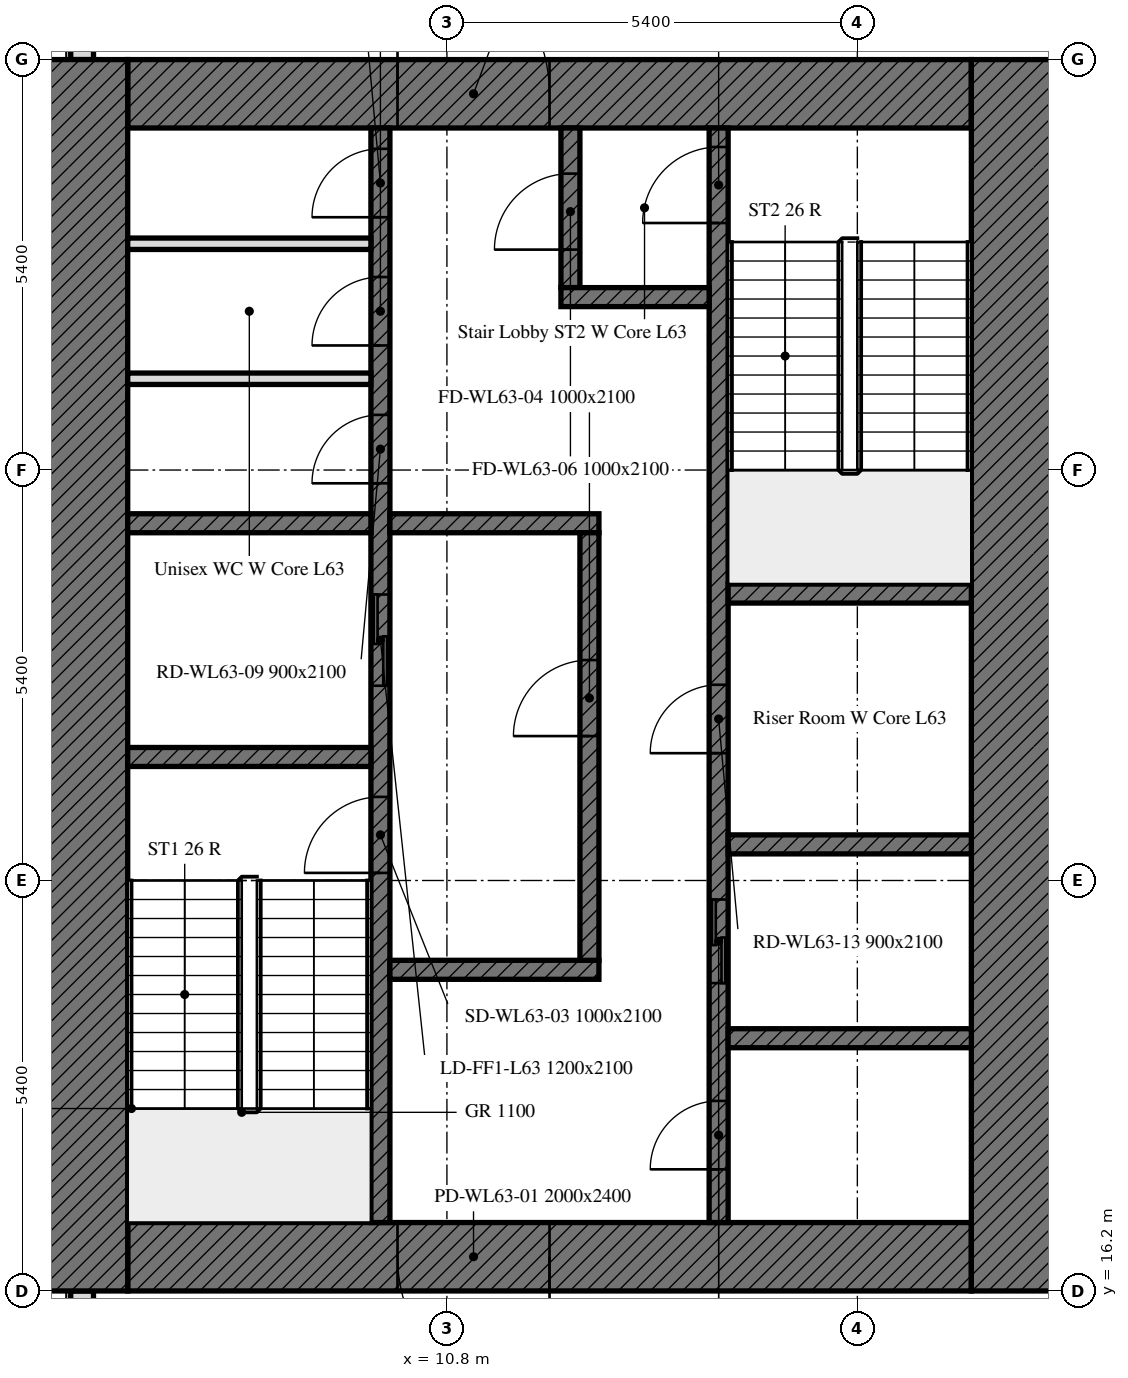
"""IFC4 building model, lengths in metres.
Left out: names, types, materials, properties, quantities, classifications, styles, units other than length and angle.
Written with IfcOpenShell. Run it as: python <this file> out.ifc"""

import sys

from ifc_helpers import new_model, si_unit, direction, frame, frame_2d, origin, place, context, subcontext, project, spatial, rectangle, extrude, element, fill, save


model = new_model("IFC4")
c1 = context("Model", 3, precision=1e-05, world=origin(), true_north=direction((0.0, 1.0)))
c2 = subcontext(c1, "Body", "Model", "MODEL_VIEW")
j1 = project(units=[si_unit("LENGTHUNIT", "METRE"), si_unit("PLANEANGLEUNIT", "RADIAN")], contexts=[c1])
p1 = place(None, origin())
s1 = spatial("IfcSite", under=j1, at=p1, CompositionType="ELEMENT")
p2 = place(p1, origin())
s2 = spatial("IfcBuilding", under=s1, at=p2, CompositionType="ELEMENT")
p3 = place(p2, frame((0.0, 0.0, 260.5)))
s3 = spatial("IfcBuildingStorey", under=s2, at=p3, CompositionType="ELEMENT", Elevation=260.5)
p4 = place(p3, frame((6.0, 37.8, 0.0), z_axis=(0.0, 0.0, 1.0), x_axis=(0.0, -1.0, 0.0)))
e1 = element("IfcWall", 1, at=p4, inside=s3, PredefinedType="SOLIDWALL", context=c2, shape_type="SweptSolid", body=[
    extrude(rectangle(XDim=5.4, YDim=0.3, at=frame_2d((2.7, 0.0))), origin(), (0.0, 0.0, 1.0), 4.5),
])
p5 = place(p4, frame((1.3, 0.0, 0.0)))
e2 = element("IfcOpeningElement", 2, at=p5, cuts=e1, PredefinedType="OPENING", context=c2, shape_type="SweptSolid", body=[
    extrude(rectangle(XDim=1.8, YDim=2.4, at=frame_2d((0.9, 1.2))), frame((0.0, 0.16, 0.0), z_axis=(0.0, -1.0, 0.0), x_axis=(1.0, 0.0, 0.0)), (0.0, 0.0, 1.0), 0.32),
])
p6 = place(p3, frame((6.0, 16.2, 0.0), z_axis=(0.0, 0.0, 1.0), x_axis=(0.0, -1.0, 0.0)))
e3 = element("IfcWall", 3, at=p6, inside=s3, PredefinedType="SOLIDWALL", context=c2, shape_type="SweptSolid", body=[
    extrude(rectangle(XDim=5.4, YDim=0.3, at=frame_2d((2.7, 0.0))), origin(), (0.0, 0.0, 1.0), 4.5),
])
p7 = place(p6, frame((2.3, 0.0, 0.0)))
e4 = element("IfcOpeningElement", 4, at=p7, cuts=e3, PredefinedType="OPENING", context=c2, shape_type="SweptSolid", body=[
    extrude(rectangle(XDim=1.8, YDim=2.4, at=frame_2d((0.9, 1.2))), frame((0.0, 0.16, 0.0), z_axis=(0.0, -1.0, 0.0), x_axis=(1.0, 0.0, 0.0)), (0.0, 0.0, 1.0), 0.32),
])
p8 = place(p3, frame((17.7, 16.65, 0.0), z_axis=(0.0, 0.0, 1.0), x_axis=(-1.0, 0.0, 0.0)))
e5 = element("IfcWall", 5, at=p8, inside=s3, PredefinedType="SOLIDWALL", context=c2, shape_type="SweptSolid", body=[
    extrude(rectangle(XDim=11.1, YDim=0.9, at=frame_2d((5.55, 0.0))), origin(), (0.0, 0.0, 1.0), 4.5),
])
p9 = place(p8, frame((5.55, 0.0, 0.0)))
e6 = element("IfcOpeningElement", 6, at=p9, cuts=e5, PredefinedType="OPENING", context=c2, shape_type="SweptSolid", body=[
    extrude(rectangle(XDim=2.0, YDim=2.4, at=frame_2d((1.0, 1.2))), frame((0.0, 0.45, 0.0), z_axis=(0.0, -1.0, 0.0), x_axis=(1.0, 0.0, 0.0)), (0.0, 0.0, 1.0), 0.9),
])
p10 = place(p3, frame((6.6, 31.95, 0.0), z_axis=(0.0, 0.0, 1.0), x_axis=(1.0, 0.0, 0.0)))
e7 = element("IfcWall", 7, at=p10, inside=s3, PredefinedType="SOLIDWALL", context=c2, shape_type="SweptSolid", body=[
    extrude(rectangle(XDim=11.1, YDim=0.9, at=frame_2d((5.55, 0.0))), origin(), (0.0, 0.0, 1.0), 4.5),
])
p11 = place(p10, frame((3.55, 0.0, 0.0)))
e8 = element("IfcOpeningElement", 8, at=p11, cuts=e7, PredefinedType="OPENING", context=c2, shape_type="SweptSolid", body=[
    extrude(rectangle(XDim=2.0, YDim=2.4, at=frame_2d((1.0, 1.2))), frame((0.0, 0.45, 0.0), z_axis=(0.0, -1.0, 0.0), x_axis=(1.0, 0.0, 0.0)), (0.0, 0.0, 1.0), 0.9),
])
for number, where, z_axis, x_axis in (
    (9, (6.0, 16.2, 0.0), (0.0, 0.0, 1.0), (0.0, 1.0, 0.0)),
    (10, (18.3, 32.4, 0.0), (0.0, 0.0, 1.0), (0.0, -1.0, 0.0)),
):
    element("IfcWall", number, at=place(p3, frame(where, z_axis=z_axis, x_axis=x_axis)), inside=s3, PredefinedType="SOLIDWALL", context=c2, shape_type="SweptSolid", body=[
        extrude(rectangle(XDim=16.2, YDim=1.2, at=frame_2d((8.1, 0.0))), origin(), (0.0, 0.0, 1.0), 4.5),
    ])
p12 = place(p3, frame((9.925, 17.1, 0.0), z_axis=(0.0, 0.0, 1.0), x_axis=(0.0, 1.0, 0.0)))
e11 = element("IfcWall", 11, at=p12, inside=s3, PredefinedType="SOLIDWALL", context=c2, shape_type="SweptSolid", body=[
    extrude(rectangle(XDim=14.4, YDim=0.25, at=frame_2d((7.2, 0.0))), origin(), (0.0, 0.0, 1.0), 4.5),
])
p13 = place(p12, frame((4.6, 0.0, 0.0)))
e12 = element("IfcOpeningElement", 12, at=p13, cuts=e11, PredefinedType="OPENING", context=c2, shape_type="SweptSolid", body=[
    extrude(rectangle(XDim=1.0, YDim=2.1, at=frame_2d((0.5, 1.05))), frame((0.0, 0.125, 0.0), z_axis=(0.0, -1.0, 0.0), x_axis=(1.0, 0.0, 0.0)), (0.0, 0.0, 1.0), 0.25),
])
p14 = place(p12, frame((7.062, 0.0, 0.0)))
e13 = element("IfcOpeningElement", 13, at=p14, cuts=e11, PredefinedType="OPENING", context=c2, shape_type="SweptSolid", body=[
    extrude(rectangle(XDim=1.2, YDim=2.1, at=frame_2d((0.6, 1.05))), frame((0.0, 0.125, 0.0), z_axis=(0.0, -1.0, 0.0), x_axis=(1.0, 0.0, 0.0)), (0.0, 0.0, 1.0), 0.25),
])
p15 = place(p12, frame((9.726, 0.0, 0.0)))
e14 = element("IfcOpeningElement", 14, at=p15, cuts=e11, PredefinedType="OPENING", context=c2, shape_type="SweptSolid", body=[
    extrude(rectangle(XDim=0.9, YDim=2.1, at=frame_2d((0.45, 1.05))), frame((0.0, 0.125, 0.0), z_axis=(0.0, -1.0, 0.0), x_axis=(1.0, 0.0, 0.0)), (0.0, 0.0, 1.0), 0.25),
])
p16 = place(p12, frame((11.539, 0.0, 0.0)))
e15 = element("IfcOpeningElement", 15, at=p16, cuts=e11, PredefinedType="OPENING", context=c2, shape_type="SweptSolid", body=[
    extrude(rectangle(XDim=0.9, YDim=2.1, at=frame_2d((0.45, 1.05))), frame((0.0, 0.125, 0.0), z_axis=(0.0, -1.0, 0.0), x_axis=(1.0, 0.0, 0.0)), (0.0, 0.0, 1.0), 0.25),
])
p17 = place(p12, frame((13.226, 0.0, 0.0)))
e16 = element("IfcOpeningElement", 16, at=p17, cuts=e11, PredefinedType="OPENING", context=c2, shape_type="SweptSolid", body=[
    extrude(rectangle(XDim=0.9, YDim=2.1, at=frame_2d((0.45, 1.05))), frame((0.0, 0.125, 0.0), z_axis=(0.0, -1.0, 0.0), x_axis=(1.0, 0.0, 0.0)), (0.0, 0.0, 1.0), 0.25),
])
p18 = place(p3, frame((14.375, 17.1, 0.0), z_axis=(0.0, 0.0, 1.0), x_axis=(0.0, 1.0, 0.0)))
e17 = element("IfcWall", 17, at=p18, inside=s3, PredefinedType="SOLIDWALL", context=c2, shape_type="SweptSolid", body=[
    extrude(rectangle(XDim=14.4, YDim=0.25, at=frame_2d((7.2, 0.0))), origin(), (0.0, 0.0, 1.0), 4.5),
])
p19 = place(p18, frame((13.15, 0.0, 0.0)))
e18 = element("IfcOpeningElement", 18, at=p19, cuts=e17, PredefinedType="OPENING", context=c2, shape_type="SweptSolid", body=[
    extrude(rectangle(XDim=1.0, YDim=2.1, at=frame_2d((0.5, 1.05))), frame((0.0, 0.125, 0.0), z_axis=(0.0, -1.0, 0.0), x_axis=(1.0, 0.0, 0.0)), (0.0, 0.0, 1.0), 0.25),
])
p20 = place(p18, frame((3.15, 0.0, 0.0)))
e19 = element("IfcOpeningElement", 19, at=p20, cuts=e17, PredefinedType="OPENING", context=c2, shape_type="SweptSolid", body=[
    extrude(rectangle(XDim=1.1, YDim=2.1, at=frame_2d((0.55, 1.05))), frame((0.0, 0.125, 0.0), z_axis=(0.0, -1.0, 0.0), x_axis=(1.0, 0.0, 0.0)), (0.0, 0.0, 1.0), 0.25),
])
p21 = place(p18, frame((0.7, 0.0, 0.0)))
e20 = element("IfcOpeningElement", 20, at=p21, cuts=e17, PredefinedType="OPENING", context=c2, shape_type="SweptSolid", body=[
    extrude(rectangle(XDim=0.9, YDim=2.1, at=frame_2d((0.45, 1.05))), frame((0.0, 0.125, 0.0), z_axis=(0.0, -1.0, 0.0), x_axis=(1.0, 0.0, 0.0)), (0.0, 0.0, 1.0), 0.25),
])
p22 = place(p18, frame((6.175, 0.0, 0.0)))
e21 = element("IfcOpeningElement", 21, at=p22, cuts=e17, PredefinedType="OPENING", context=c2, shape_type="SweptSolid", body=[
    extrude(rectangle(XDim=0.9, YDim=2.1, at=frame_2d((0.45, 1.05))), frame((0.0, 0.125, 0.0), z_axis=(0.0, -1.0, 0.0), x_axis=(1.0, 0.0, 0.0)), (0.0, 0.0, 1.0), 0.25),
])
for number, where, z_axis, x_axis in (
    (22, (6.6, 23.225, 0.0), (0.0, 0.0, 1.0), (1.0, 0.0, 0.0)),
    (23, (14.5, 25.375, 0.0), (0.0, 0.0, 1.0), (1.0, 0.0, 0.0)),
    (24, (14.5, 22.075, 0.0), (0.0, 0.0, 1.0), (1.0, 0.0, 0.0)),
    (25, (6.6, 26.3, 0.0), (0.0, 0.0, 1.0), (1.0, 0.0, 0.0)),
):
    element("IfcWall", number, at=place(p3, frame(where, z_axis=z_axis, x_axis=x_axis)), inside=s3, PredefinedType="SOLIDWALL", context=c2, shape_type="SweptSolid", body=[
        extrude(rectangle(XDim=3.2, YDim=0.25, at=frame_2d((1.6, 0.0))), origin(), (0.0, 0.0, 1.0), 4.5),
    ])
for number, where, z_axis, x_axis in (
    (26, (10.05, 26.3, 0.0), (0.0, 0.0, 1.0), (1.0, 0.0, 0.0)),
    (27, (10.05, 20.425, 0.0), (0.0, 0.0, 1.0), (1.0, 0.0, 0.0)),
):
    element("IfcWall", number, at=place(p3, frame(where, z_axis=z_axis, x_axis=x_axis)), inside=s3, PredefinedType="SOLIDWALL", context=c2, shape_type="SweptSolid", body=[
        extrude(rectangle(XDim=2.75, YDim=0.25, at=frame_2d((1.375, 0.0))), origin(), (0.0, 0.0, 1.0), 4.5),
    ])
p23 = place(p3, frame((12.425, 29.4, 0.0), z_axis=(0.0, 0.0, 1.0), x_axis=(0.0, 1.0, 0.0)))
e28 = element("IfcWall", 28, at=p23, inside=s3, PredefinedType="SOLIDWALL", context=c2, shape_type="SweptSolid", body=[
    extrude(rectangle(XDim=2.1, YDim=0.25, at=frame_2d((1.05, 0.0))), origin(), (0.0, 0.0, 1.0), 4.5),
])
p24 = place(p23, frame((0.5, 0.0, 0.0)))
e29 = element("IfcOpeningElement", 29, at=p24, cuts=e28, PredefinedType="OPENING", context=c2, shape_type="SweptSolid", body=[
    extrude(rectangle(XDim=1.0, YDim=2.1, at=frame_2d((0.5, 1.05))), frame((0.0, 0.125, 0.0), z_axis=(0.0, -1.0, 0.0), x_axis=(1.0, 0.0, 0.0)), (0.0, 0.0, 1.0), 0.25),
])
p25 = place(p3, frame((12.3, 29.275, 0.0), z_axis=(0.0, 0.0, 1.0), x_axis=(1.0, 0.0, 0.0)))
e30 = element("IfcWall", 30, at=p25, inside=s3, PredefinedType="SOLIDWALL", context=c2, shape_type="SweptSolid", body=[
    extrude(rectangle(XDim=1.95, YDim=0.25, at=frame_2d((0.975, 0.0))), origin(), (0.0, 0.0, 1.0), 4.5),
])
p26 = place(p3, frame((12.675, 20.55, 0.0), z_axis=(0.0, 0.0, 1.0), x_axis=(0.0, 1.0, 0.0)))
e31 = element("IfcWall", 31, at=p26, inside=s3, PredefinedType="SOLIDWALL", context=c2, shape_type="SweptSolid", body=[
    extrude(rectangle(XDim=5.625, YDim=0.25, at=frame_2d((2.812, 0.0))), origin(), (0.0, 0.0, 1.0), 4.5),
])
p27 = place(p26, frame((2.95, 0.0, 0.0)))
e32 = element("IfcOpeningElement", 32, at=p27, cuts=e31, PredefinedType="OPENING", context=c2, shape_type="SweptSolid", body=[
    extrude(rectangle(XDim=1.0, YDim=2.1, at=frame_2d((0.5, 1.05))), frame((0.0, 0.125, 0.0), z_axis=(0.0, -1.0, 0.0), x_axis=(1.0, 0.0, 0.0)), (0.0, 0.0, 1.0), 0.25),
])
p28 = place(p3, frame((14.5, 19.525, 0.0), z_axis=(0.0, 0.0, 1.0), x_axis=(1.0, 0.0, 0.0)))
e33 = element("IfcWall", 33, at=p28, inside=s3, PredefinedType="SOLIDWALL", context=c2, shape_type="SweptSolid", body=[
    extrude(rectangle(XDim=3.2, YDim=0.25, at=frame_2d((1.6, 0.0))), origin(), (0.0, 0.0, 1.0), 4.5),
])
for number, where, z_axis, x_axis in (
    (34, (6.6, 28.201, 0.0), (0.0, 0.0, 1.0), (1.0, 0.0, 0.0)),
    (35, (6.6, 29.977, 0.0), (0.0, 0.0, 1.0), (1.0, 0.0, 0.0)),
):
    element("IfcWall", number, at=place(p3, frame(where, z_axis=z_axis, x_axis=x_axis)), inside=s3, PredefinedType="PARTITIONING", context=c2, shape_type="SweptSolid", body=[
        extrude(rectangle(XDim=3.2, YDim=0.15, at=frame_2d((1.6, 0.0))), origin(), (0.0, 0.0, 1.0), 4.5),
    ])
p29 = place(p9, origin())
e36 = element("IfcDoor", 36, at=p29, inside=s3, OperationType="DOUBLE_DOOR_SINGLE_SWING", PredefinedType="DOOR", context=c2, shape_type="SweptSolid", body=[
    extrude(rectangle(XDim=2.0, YDim=2.4, at=frame_2d((1.0, 1.2))), frame((0.0, 0.025, 0.0), z_axis=(0.0, -1.0, 0.0), x_axis=(1.0, 0.0, 0.0)), (0.0, 0.0, 1.0), 0.05),
])
fill(e6, e36)
p30 = place(p11, origin())
e37 = element("IfcDoor", 37, at=p30, inside=s3, OperationType="DOUBLE_DOOR_SINGLE_SWING", PredefinedType="DOOR", context=c2, shape_type="SweptSolid", body=[
    extrude(rectangle(XDim=2.0, YDim=2.4, at=frame_2d((1.0, 1.2))), frame((0.0, 0.025, 0.0), z_axis=(0.0, -1.0, 0.0), x_axis=(1.0, 0.0, 0.0)), (0.0, 0.0, 1.0), 0.05),
])
fill(e8, e37)
p31 = place(p13, origin())
e38 = element("IfcDoor", 38, at=p31, inside=s3, OperationType="SINGLE_SWING_LEFT", PredefinedType="DOOR", context=c2, shape_type="SweptSolid", body=[
    extrude(rectangle(XDim=1.0, YDim=2.1, at=frame_2d((0.5, 1.05))), frame((0.0, 0.025, 0.0), z_axis=(0.0, -1.0, 0.0), x_axis=(1.0, 0.0, 0.0)), (0.0, 0.0, 1.0), 0.05),
])
fill(e12, e38)
p32 = place(p27, origin())
e39 = element("IfcDoor", 39, at=p32, inside=s3, OperationType="SINGLE_SWING_LEFT", PredefinedType="DOOR", context=c2, shape_type="SweptSolid", body=[
    extrude(rectangle(XDim=1.0, YDim=2.1, at=frame_2d((0.5, 1.05))), frame((0.0, 0.025, 0.0), z_axis=(0.0, -1.0, 0.0), x_axis=(1.0, 0.0, 0.0)), (0.0, 0.0, 1.0), 0.05),
])
fill(e32, e39)
p33 = place(p19, origin())
e40 = element("IfcDoor", 40, at=p33, inside=s3, OperationType="SINGLE_SWING_LEFT", PredefinedType="DOOR", context=c2, shape_type="SweptSolid", body=[
    extrude(rectangle(XDim=1.0, YDim=2.1, at=frame_2d((0.5, 1.05))), frame((0.0, 0.025, 0.0), z_axis=(0.0, -1.0, 0.0), x_axis=(1.0, 0.0, 0.0)), (0.0, 0.0, 1.0), 0.05),
])
fill(e18, e40)
p34 = place(p24, origin())
e41 = element("IfcDoor", 41, at=p34, inside=s3, OperationType="SINGLE_SWING_LEFT", PredefinedType="DOOR", context=c2, shape_type="SweptSolid", body=[
    extrude(rectangle(XDim=1.0, YDim=2.1, at=frame_2d((0.5, 1.05))), frame((0.0, 0.025, 0.0), z_axis=(0.0, -1.0, 0.0), x_axis=(1.0, 0.0, 0.0)), (0.0, 0.0, 1.0), 0.05),
])
fill(e29, e41)
p35 = place(p14, origin())
e42 = element("IfcDoor", 42, at=p35, inside=s3, OperationType="DOUBLE_DOOR_SLIDING", PredefinedType="DOOR", context=c2, shape_type="SweptSolid", body=[
    extrude(rectangle(XDim=1.2, YDim=2.1, at=frame_2d((0.6, 1.05))), frame((0.0, 0.025, 0.0), z_axis=(0.0, -1.0, 0.0), x_axis=(1.0, 0.0, 0.0)), (0.0, 0.0, 1.0), 0.05),
])
fill(e13, e42)
p36 = place(p20, origin())
e43 = element("IfcDoor", 43, at=p36, inside=s3, OperationType="DOUBLE_DOOR_SLIDING", PredefinedType="DOOR", context=c2, shape_type="SweptSolid", body=[
    extrude(rectangle(XDim=1.1, YDim=2.1, at=frame_2d((0.55, 1.05))), frame((0.0, 0.025, 0.0), z_axis=(0.0, -1.0, 0.0), x_axis=(1.0, 0.0, 0.0)), (0.0, 0.0, 1.0), 0.05),
])
fill(e19, e43)
p37 = place(p15, origin())
e44 = element("IfcDoor", 44, at=p37, inside=s3, OperationType="SINGLE_SWING_LEFT", PredefinedType="DOOR", context=c2, shape_type="SweptSolid", body=[
    extrude(rectangle(XDim=0.9, YDim=2.1, at=frame_2d((0.45, 1.05))), frame((0.0, 0.025, 0.0), z_axis=(0.0, -1.0, 0.0), x_axis=(1.0, 0.0, 0.0)), (0.0, 0.0, 1.0), 0.05),
])
fill(e14, e44)
p38 = place(p16, origin())
e45 = element("IfcDoor", 45, at=p38, inside=s3, OperationType="SINGLE_SWING_LEFT", PredefinedType="DOOR", context=c2, shape_type="SweptSolid", body=[
    extrude(rectangle(XDim=0.9, YDim=2.1, at=frame_2d((0.45, 1.05))), frame((0.0, 0.025, 0.0), z_axis=(0.0, -1.0, 0.0), x_axis=(1.0, 0.0, 0.0)), (0.0, 0.0, 1.0), 0.05),
])
fill(e15, e45)
p39 = place(p17, origin())
e46 = element("IfcDoor", 46, at=p39, inside=s3, OperationType="SINGLE_SWING_LEFT", PredefinedType="DOOR", context=c2, shape_type="SweptSolid", body=[
    extrude(rectangle(XDim=0.9, YDim=2.1, at=frame_2d((0.45, 1.05))), frame((0.0, 0.025, 0.0), z_axis=(0.0, -1.0, 0.0), x_axis=(1.0, 0.0, 0.0)), (0.0, 0.0, 1.0), 0.05),
])
fill(e16, e46)
p40 = place(p21, origin())
e47 = element("IfcDoor", 47, at=p40, inside=s3, OperationType="SINGLE_SWING_LEFT", PredefinedType="DOOR", context=c2, shape_type="SweptSolid", body=[
    extrude(rectangle(XDim=0.9, YDim=2.1, at=frame_2d((0.45, 1.05))), frame((0.0, 0.025, 0.0), z_axis=(0.0, -1.0, 0.0), x_axis=(1.0, 0.0, 0.0)), (0.0, 0.0, 1.0), 0.05),
])
fill(e20, e47)
p41 = place(p22, origin())
e48 = element("IfcDoor", 48, at=p41, inside=s3, OperationType="SINGLE_SWING_LEFT", PredefinedType="DOOR", context=c2, shape_type="SweptSolid", body=[
    extrude(rectangle(XDim=0.9, YDim=2.1, at=frame_2d((0.45, 1.05))), frame((0.0, 0.025, 0.0), z_axis=(0.0, -1.0, 0.0), x_axis=(1.0, 0.0, 0.0)), (0.0, 0.0, 1.0), 0.05),
])
fill(e21, e48)
save(model, sys.argv[1])
